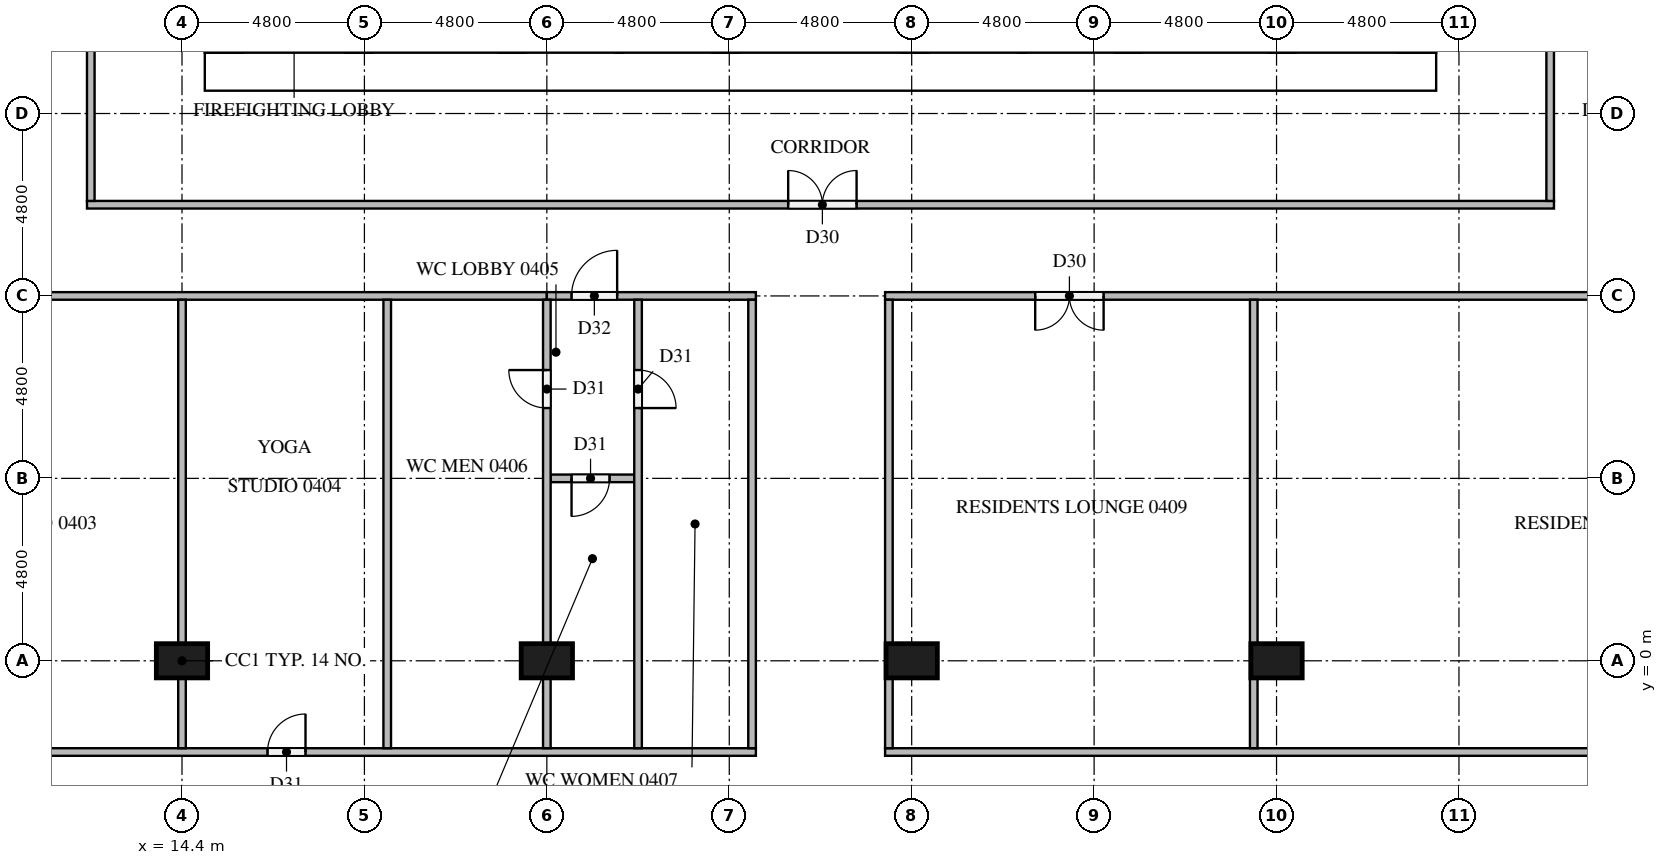
"""IFC4 building model, lengths in metres.
Left out: names, types, materials, properties, quantities, classifications, styles, units other than length and angle.
Written with IfcOpenShell. Run it as: python <this file> out.ifc"""

import sys

from ifc_helpers import new_model, si_unit, direction, frame, frame_2d, origin, origin_2d, place, context, subcontext, project, spatial, rectangle, extrude, element, fill, save


model = new_model("IFC4")
c1 = context("Model", 3, precision=1e-05, world=origin(), true_north=direction((0.0, 1.0)))
c2 = subcontext(c1, "Body", "Model", "MODEL_VIEW")
j1 = project(units=[si_unit("LENGTHUNIT", "METRE"), si_unit("PLANEANGLEUNIT", "RADIAN")], contexts=[c1])
p1 = place(None, origin())
s1 = spatial("IfcSite", under=j1, at=p1, CompositionType="ELEMENT")
p2 = place(p1, origin())
s2 = spatial("IfcBuilding", under=s1, at=p2, CompositionType="ELEMENT")
p3 = place(p2, frame((0.0, 0.0, 19.5)))
s3 = spatial("IfcBuildingStorey", under=s2, at=p3, CompositionType="ELEMENT", Elevation=19.5)
p4 = place(p3, frame((15.0, 15.5, 0.0), z_axis=(0.0, 0.0, 1.0), x_axis=(1.0, 0.0, 0.0)))
e1 = element("IfcWall", 1, at=p4, inside=s3, PredefinedType="SHEAR", context=c2, shape_type="SweptSolid", body=[
    extrude(rectangle(XDim=32.4, YDim=1.0, at=frame_2d((16.2, 0.0))), origin(), (0.0, 0.0, 1.0), 4.1),
])
p5 = place(p4, frame((15.3, 0.0, 0.0)))
e2 = element("IfcOpeningElement", 2, at=p5, cuts=e1, PredefinedType="OPENING", context=c2, shape_type="SweptSolid", body=[
    extrude(rectangle(XDim=1.8, YDim=2.1, at=frame_2d((0.9, 1.05))), frame((0.0, 0.51, 0.0), z_axis=(0.0, -1.0, 0.0), x_axis=(1.0, 0.0, 0.0)), (0.0, 0.0, 1.0), 1.02),
])
p6 = place(p3, frame((15.5, 16.0, 0.0), z_axis=(0.0, 0.0, 1.0), x_axis=(0.0, 1.0, 0.0)))
e3 = element("IfcWall", 3, at=p6, inside=s3, PredefinedType="SHEAR", context=c2, shape_type="SweptSolid", body=[
    extrude(rectangle(XDim=20.8, YDim=1.0, at=frame_2d((10.4, 0.0))), origin(), (0.0, 0.0, 1.0), 4.1),
])
p7 = place(p6, frame((4.76, 0.0, 0.0)))
e4 = element("IfcOpeningElement", 4, at=p7, cuts=e3, PredefinedType="OPENING", context=c2, shape_type="SweptSolid", body=[
    extrude(rectangle(XDim=1.2, YDim=2.1, at=frame_2d((0.6, 1.05))), frame((0.0, 0.51, 0.0), z_axis=(0.0, -1.0, 0.0), x_axis=(1.0, 0.0, 0.0)), (0.0, 0.0, 1.0), 1.02),
])
p8 = place(p3, frame((46.9, 16.0, 0.0), z_axis=(0.0, 0.0, 1.0), x_axis=(0.0, 1.0, 0.0)))
e5 = element("IfcWall", 5, at=p8, inside=s3, PredefinedType="SHEAR", context=c2, shape_type="SweptSolid", body=[
    extrude(rectangle(XDim=20.8, YDim=1.0, at=frame_2d((10.4, 0.0))), origin(), (0.0, 0.0, 1.0), 4.1),
])
p9 = place(p8, frame((10.1, 0.0, 0.0)))
e6 = element("IfcOpeningElement", 6, at=p9, cuts=e5, PredefinedType="OPENING", context=c2, shape_type="SweptSolid", body=[
    extrude(rectangle(XDim=1.2, YDim=2.1, at=frame_2d((0.6, 1.05))), frame((0.0, 0.51, 0.0), z_axis=(0.0, -1.0, 0.0), x_axis=(1.0, 0.0, 0.0)), (0.0, 0.0, 1.0), 1.02),
])
p10 = place(p3, frame((23.1, 16.0, 0.0), z_axis=(0.0, 0.0, 1.0), x_axis=(0.0, 1.0, 0.0)))
e7 = element("IfcWall", 7, at=p10, inside=s3, PredefinedType="SHEAR", context=c2, shape_type="SweptSolid", body=[
    extrude(rectangle(XDim=20.8, YDim=0.7, at=frame_2d((10.4, 0.0))), origin(), (0.0, 0.0, 1.0), 4.1),
])
for number, where, z_axis, x_axis in (
    (8, (14.4, 0.0, 0.0), (0.0, 0.0, 1.0), (1.0, 0.0, 0.0)),
    (9, (24.0, 0.0, 0.0), (0.0, 0.0, 1.0), (1.0, 0.0, 0.0)),
    (10, (33.6, 0.0, 0.0), (0.0, 0.0, 1.0), (1.0, 0.0, 0.0)),
    (11, (43.2, 0.0, 0.0), (0.0, 0.0, 1.0), (1.0, 0.0, 0.0)),
):
    element("IfcColumn", number, at=place(p3, frame(where, z_axis=z_axis, x_axis=x_axis)), inside=s3, PredefinedType="COLUMN", context=c2, shape_type="SweptSolid", body=[
        extrude(rectangle(XDim=1.35, YDim=0.9, at=origin_2d()), origin(), (0.0, 0.0, 1.0), 4.1),
    ])
p11 = place(p3, frame((-3.1, -2.4, 0.0), z_axis=(0.0, 0.0, 1.0), x_axis=(1.0, 0.0, 0.0)))
e12 = element("IfcWall", 12, at=p11, inside=s3, PredefinedType="PARTITIONING", context=c2, shape_type="SweptSolid", body=[
    extrude(rectangle(XDim=32.6, YDim=0.2, at=frame_2d((16.3, 0.0))), origin(), (0.0, 0.0, 1.0), 4.1),
])
p12 = place(p11, frame((1.05, 0.0, 0.0)))
e13 = element("IfcOpeningElement", 13, at=p12, cuts=e12, PredefinedType="OPENING", context=c2, shape_type="SweptSolid", body=[
    extrude(rectangle(XDim=1.0, YDim=2.1, at=frame_2d((0.5, 1.05))), frame((0.0, 0.11, 0.0), z_axis=(0.0, -1.0, 0.0), x_axis=(1.0, 0.0, 0.0)), (0.0, 0.0, 1.0), 0.22),
])
p13 = place(p11, frame((4.95, 0.0, 0.0)))
e14 = element("IfcOpeningElement", 14, at=p13, cuts=e12, PredefinedType="OPENING", context=c2, shape_type="SweptSolid", body=[
    extrude(rectangle(XDim=1.0, YDim=2.1, at=frame_2d((0.5, 1.05))), frame((0.0, 0.11, 0.0), z_axis=(0.0, -1.0, 0.0), x_axis=(1.0, 0.0, 0.0)), (0.0, 0.0, 1.0), 0.22),
])
p14 = place(p11, frame((19.75, 0.0, 0.0)))
e15 = element("IfcOpeningElement", 15, at=p14, cuts=e12, PredefinedType="OPENING", context=c2, shape_type="SweptSolid", body=[
    extrude(rectangle(XDim=1.0, YDim=2.1, at=frame_2d((0.5, 1.05))), frame((0.0, 0.11, 0.0), z_axis=(0.0, -1.0, 0.0), x_axis=(1.0, 0.0, 0.0)), (0.0, 0.0, 1.0), 0.22),
])
p15 = place(p3, frame((32.9, -2.4, 0.0), z_axis=(0.0, 0.0, 1.0), x_axis=(1.0, 0.0, 0.0)))
e16 = element("IfcWall", 16, at=p15, inside=s3, PredefinedType="PARTITIONING", context=c2, shape_type="SweptSolid", body=[
    extrude(rectangle(XDim=32.6, YDim=0.2, at=frame_2d((16.3, 0.0))), origin(), (0.0, 0.0, 1.0), 4.1),
])
p16 = place(p15, frame((18.65, 0.0, 0.0)))
e17 = element("IfcOpeningElement", 17, at=p16, cuts=e16, PredefinedType="OPENING", context=c2, shape_type="SweptSolid", body=[
    extrude(rectangle(XDim=1.8, YDim=2.1, at=frame_2d((0.9, 1.05))), frame((0.0, 0.11, 0.0), z_axis=(0.0, -1.0, 0.0), x_axis=(1.0, 0.0, 0.0)), (0.0, 0.0, 1.0), 0.22),
])
p17 = place(p3, frame((26.3, 4.8, 0.0), z_axis=(0.0, 0.0, 1.0), x_axis=(-1.0, 0.0, 0.0)))
e18 = element("IfcWall", 18, at=p17, inside=s3, PredefinedType="PARTITIONING", context=c2, shape_type="SweptSolid", body=[
    extrude(rectangle(XDim=2.2, YDim=0.2, at=frame_2d((1.1, 0.0))), origin(), (0.0, 0.0, 1.0), 4.1),
])
p18 = place(p17, frame((0.65, 0.0, 0.0)))
e19 = element("IfcOpeningElement", 19, at=p18, cuts=e18, PredefinedType="OPENING", context=c2, shape_type="SweptSolid", body=[
    extrude(rectangle(XDim=1.0, YDim=2.1, at=frame_2d((0.5, 1.05))), frame((0.0, 0.11, 0.0), z_axis=(0.0, -1.0, 0.0), x_axis=(1.0, 0.0, 0.0)), (0.0, 0.0, 1.0), 0.22),
])
p19 = place(p3, frame((24.0, 9.6, 0.0), z_axis=(0.0, 0.0, 1.0), x_axis=(-1.0, 0.0, 0.0)))
e20 = element("IfcWall", 20, at=p19, inside=s3, PredefinedType="PARTITIONING", context=c2, shape_type="SweptSolid", body=[
    extrude(rectangle(XDim=28.9, YDim=0.2, at=frame_2d((14.45, 0.0))), origin(), (0.0, 0.0, 1.0), 4.1),
])
p20 = place(p19, frame((13.95, 0.0, 0.0)))
e21 = element("IfcOpeningElement", 21, at=p20, cuts=e20, PredefinedType="OPENING", context=c2, shape_type="SweptSolid", body=[
    extrude(rectangle(XDim=1.0, YDim=2.1, at=frame_2d((0.5, 1.05))), frame((0.0, 0.11, 0.0), z_axis=(0.0, -1.0, 0.0), x_axis=(1.0, 0.0, 0.0)), (0.0, 0.0, 1.0), 0.22),
])
p21 = place(p3, frame((24.0, 9.6, 0.0), z_axis=(0.0, 0.0, 1.0), x_axis=(1.0, 0.0, 0.0)))
e22 = element("IfcWall", 22, at=p21, inside=s3, PredefinedType="PARTITIONING", context=c2, shape_type="SweptSolid", body=[
    extrude(rectangle(XDim=5.5, YDim=0.2, at=frame_2d((2.75, 0.0))), origin(), (0.0, 0.0, 1.0), 4.1),
])
p22 = place(p21, frame((0.65, 0.0, 0.0)))
e23 = element("IfcOpeningElement", 23, at=p22, cuts=e22, PredefinedType="OPENING", context=c2, shape_type="SweptSolid", body=[
    extrude(rectangle(XDim=1.2, YDim=2.1, at=frame_2d((0.6, 1.05))), frame((0.0, 0.11, 0.0), z_axis=(0.0, -1.0, 0.0), x_axis=(1.0, 0.0, 0.0)), (0.0, 0.0, 1.0), 0.22),
])
p23 = place(p3, frame((65.65, 9.6, 0.0), z_axis=(0.0, 0.0, 1.0), x_axis=(-1.0, 0.0, 0.0)))
e24 = element("IfcWall", 24, at=p23, inside=s3, PredefinedType="PARTITIONING", context=c2, shape_type="SweptSolid", body=[
    extrude(rectangle(XDim=32.75, YDim=0.2, at=frame_2d((16.375, 0.0))), origin(), (0.0, 0.0, 1.0), 4.1),
])
p24 = place(p23, frame((27.0, 0.0, 0.0)))
e25 = element("IfcOpeningElement", 25, at=p24, cuts=e24, PredefinedType="OPENING", context=c2, shape_type="SweptSolid", body=[
    extrude(rectangle(XDim=1.8, YDim=2.1, at=frame_2d((0.9, 1.05))), frame((0.0, 0.11, 0.0), z_axis=(0.0, -1.0, 0.0), x_axis=(1.0, 0.0, 0.0)), (0.0, 0.0, 1.0), 0.22),
])
p25 = place(p3, frame((11.9, 12.0, 0.0), z_axis=(0.0, 0.0, 1.0), x_axis=(1.0, 0.0, 0.0)))
e26 = element("IfcWall", 26, at=p25, inside=s3, PredefinedType="PARTITIONING", context=c2, shape_type="SweptSolid", body=[
    extrude(rectangle(XDim=38.6, YDim=0.2, at=frame_2d((19.3, 0.0))), origin(), (0.0, 0.0, 1.0), 4.1),
])
p26 = place(p25, frame((18.45, 0.0, 0.0)))
e27 = element("IfcOpeningElement", 27, at=p26, cuts=e26, PredefinedType="OPENING", context=c2, shape_type="SweptSolid", body=[
    extrude(rectangle(XDim=1.8, YDim=2.1, at=frame_2d((0.9, 1.05))), frame((0.0, 0.11, 0.0), z_axis=(0.0, -1.0, 0.0), x_axis=(1.0, 0.0, 0.0)), (0.0, 0.0, 1.0), 0.22),
])
p27 = place(p3, frame((12.0, 40.7, 0.0), z_axis=(0.0, 0.0, 1.0), x_axis=(0.0, -1.0, 0.0)))
e28 = element("IfcWall", 28, at=p27, inside=s3, PredefinedType="PARTITIONING", context=c2, shape_type="SweptSolid", body=[
    extrude(rectangle(XDim=28.6, YDim=0.2, at=frame_2d((14.3, 0.0))), origin(), (0.0, 0.0, 1.0), 4.1),
])
p28 = place(p27, frame((6.85, 0.0, 0.0)))
e29 = element("IfcOpeningElement", 29, at=p28, cuts=e28, PredefinedType="OPENING", context=c2, shape_type="SweptSolid", body=[
    extrude(rectangle(XDim=1.8, YDim=2.1, at=frame_2d((0.9, 1.05))), frame((0.0, 0.11, 0.0), z_axis=(0.0, -1.0, 0.0), x_axis=(1.0, 0.0, 0.0)), (0.0, 0.0, 1.0), 0.22),
])
for number, where, z_axis, x_axis in (
    (30, (14.4, -2.3, 0.0), (0.0, 0.0, 1.0), (0.0, 1.0, 0.0)),
    (31, (19.8, -2.3, 0.0), (0.0, 0.0, 1.0), (0.0, 1.0, 0.0)),
):
    element("IfcWall", number, at=place(p3, frame(where, z_axis=z_axis, x_axis=x_axis)), inside=s3, PredefinedType="PARTITIONING", context=c2, shape_type="SweptSolid", body=[
        extrude(rectangle(XDim=11.8, YDim=0.2, at=frame_2d((5.9, 0.0))), origin(), (0.0, 0.0, 1.0), 4.1),
    ])
p29 = place(p3, frame((24.0, -2.3, 0.0), z_axis=(0.0, 0.0, 1.0), x_axis=(0.0, 1.0, 0.0)))
e32 = element("IfcWall", 32, at=p29, inside=s3, PredefinedType="PARTITIONING", context=c2, shape_type="SweptSolid", body=[
    extrude(rectangle(XDim=11.8, YDim=0.2, at=frame_2d((5.9, 0.0))), origin(), (0.0, 0.0, 1.0), 4.1),
])
p30 = place(p29, frame((8.95, 0.0, 0.0)))
e33 = element("IfcOpeningElement", 33, at=p30, cuts=e32, PredefinedType="OPENING", context=c2, shape_type="SweptSolid", body=[
    extrude(rectangle(XDim=1.0, YDim=2.1, at=frame_2d((0.5, 1.05))), frame((0.0, 0.11, 0.0), z_axis=(0.0, -1.0, 0.0), x_axis=(1.0, 0.0, 0.0)), (0.0, 0.0, 1.0), 0.22),
])
p31 = place(p3, frame((26.4, 9.5, 0.0), z_axis=(0.0, 0.0, 1.0), x_axis=(0.0, -1.0, 0.0)))
e34 = element("IfcWall", 34, at=p31, inside=s3, PredefinedType="PARTITIONING", context=c2, shape_type="SweptSolid", body=[
    extrude(rectangle(XDim=11.8, YDim=0.2, at=frame_2d((5.9, 0.0))), origin(), (0.0, 0.0, 1.0), 4.1),
])
p32 = place(p31, frame((1.85, 0.0, 0.0)))
e35 = element("IfcOpeningElement", 35, at=p32, cuts=e34, PredefinedType="OPENING", context=c2, shape_type="SweptSolid", body=[
    extrude(rectangle(XDim=1.0, YDim=2.1, at=frame_2d((0.5, 1.05))), frame((0.0, 0.11, 0.0), z_axis=(0.0, -1.0, 0.0), x_axis=(1.0, 0.0, 0.0)), (0.0, 0.0, 1.0), 0.22),
])
for number, where, z_axis, x_axis in (
    (36, (29.4, -2.3, 0.0), (0.0, 0.0, 1.0), (0.0, 1.0, 0.0)),
    (37, (33.0, -2.3, 0.0), (0.0, 0.0, 1.0), (0.0, 1.0, 0.0)),
    (38, (42.6, -2.3, 0.0), (0.0, 0.0, 1.0), (0.0, 1.0, 0.0)),
):
    element("IfcWall", number, at=place(p3, frame(where, z_axis=z_axis, x_axis=x_axis)), inside=s3, PredefinedType="PARTITIONING", context=c2, shape_type="SweptSolid", body=[
        extrude(rectangle(XDim=11.8, YDim=0.2, at=frame_2d((5.9, 0.0))), origin(), (0.0, 0.0, 1.0), 4.1),
    ])
p33 = place(p3, frame((50.4, 12.1, 0.0), z_axis=(0.0, 0.0, 1.0), x_axis=(0.0, 1.0, 0.0)))
e39 = element("IfcWall", 39, at=p33, inside=s3, PredefinedType="PARTITIONING", context=c2, shape_type="SweptSolid", body=[
    extrude(rectangle(XDim=28.6, YDim=0.2, at=frame_2d((14.3, 0.0))), origin(), (0.0, 0.0, 1.0), 4.1),
])
p34 = place(p33, frame((20.05, 0.0, 0.0)))
e40 = element("IfcOpeningElement", 40, at=p34, cuts=e39, PredefinedType="OPENING", context=c2, shape_type="SweptSolid", body=[
    extrude(rectangle(XDim=1.8, YDim=2.1, at=frame_2d((0.9, 1.05))), frame((0.0, 0.11, 0.0), z_axis=(0.0, -1.0, 0.0), x_axis=(1.0, 0.0, 0.0)), (0.0, 0.0, 1.0), 0.22),
])
p35 = place(p5, frame((1.8, 0.0, 0.0), z_axis=(0.0, 0.0, 1.0), x_axis=(-1.0, 0.0, 0.0)))
e41 = element("IfcDoor", 41, at=p35, inside=s3, OperationType="DOUBLE_DOOR_SINGLE_SWING", PredefinedType="DOOR", context=c2, shape_type="SweptSolid", body=[
    extrude(rectangle(XDim=1.8, YDim=2.1, at=frame_2d((0.9, 1.05))), frame((0.0, 0.025, 0.0), z_axis=(0.0, -1.0, 0.0), x_axis=(1.0, 0.0, 0.0)), (0.0, 0.0, 1.0), 0.05),
])
fill(e2, e41)
p36 = place(p14, origin())
e42 = element("IfcDoor", 42, at=p36, inside=s3, OperationType="SINGLE_SWING_RIGHT", PredefinedType="DOOR", context=c2, shape_type="SweptSolid", body=[
    extrude(rectangle(XDim=1.0, YDim=2.1, at=frame_2d((0.5, 1.05))), frame((0.0, 0.025, 0.0), z_axis=(0.0, -1.0, 0.0), x_axis=(1.0, 0.0, 0.0)), (0.0, 0.0, 1.0), 0.05),
])
fill(e15, e42)
p37 = place(p22, origin())
e43 = element("IfcDoor", 43, at=p37, inside=s3, OperationType="SINGLE_SWING_RIGHT", PredefinedType="DOOR", context=c2, shape_type="SweptSolid", body=[
    extrude(rectangle(XDim=1.2, YDim=2.1, at=frame_2d((0.6, 1.05))), frame((0.0, 0.025, 0.0), z_axis=(0.0, -1.0, 0.0), x_axis=(1.0, 0.0, 0.0)), (0.0, 0.0, 1.0), 0.05),
])
fill(e23, e43)
p38 = place(p30, origin())
e44 = element("IfcDoor", 44, at=p38, inside=s3, OperationType="SINGLE_SWING_RIGHT", PredefinedType="DOOR", context=c2, shape_type="SweptSolid", body=[
    extrude(rectangle(XDim=1.0, YDim=2.1, at=frame_2d((0.5, 1.05))), frame((0.0, 0.025, 0.0), z_axis=(0.0, -1.0, 0.0), x_axis=(1.0, 0.0, 0.0)), (0.0, 0.0, 1.0), 0.05),
])
fill(e33, e44)
p39 = place(p32, origin())
e45 = element("IfcDoor", 45, at=p39, inside=s3, OperationType="SINGLE_SWING_RIGHT", PredefinedType="DOOR", context=c2, shape_type="SweptSolid", body=[
    extrude(rectangle(XDim=1.0, YDim=2.1, at=frame_2d((0.5, 1.05))), frame((0.0, 0.025, 0.0), z_axis=(0.0, -1.0, 0.0), x_axis=(1.0, 0.0, 0.0)), (0.0, 0.0, 1.0), 0.05),
])
fill(e35, e45)
p40 = place(p18, origin())
e46 = element("IfcDoor", 46, at=p40, inside=s3, OperationType="SINGLE_SWING_RIGHT", PredefinedType="DOOR", context=c2, shape_type="SweptSolid", body=[
    extrude(rectangle(XDim=1.0, YDim=2.1, at=frame_2d((0.5, 1.05))), frame((0.0, 0.025, 0.0), z_axis=(0.0, -1.0, 0.0), x_axis=(1.0, 0.0, 0.0)), (0.0, 0.0, 1.0), 0.05),
])
fill(e19, e46)
p41 = place(p24, origin())
e47 = element("IfcDoor", 47, at=p41, inside=s3, OperationType="DOUBLE_DOOR_SINGLE_SWING", PredefinedType="DOOR", context=c2, shape_type="SweptSolid", body=[
    extrude(rectangle(XDim=1.8, YDim=2.1, at=frame_2d((0.9, 1.05))), frame((0.0, 0.025, 0.0), z_axis=(0.0, -1.0, 0.0), x_axis=(1.0, 0.0, 0.0)), (0.0, 0.0, 1.0), 0.05),
])
fill(e25, e47)
p42 = place(p26, origin())
e48 = element("IfcDoor", 48, at=p42, inside=s3, OperationType="DOUBLE_DOOR_SINGLE_SWING", PredefinedType="DOOR", context=c2, shape_type="SweptSolid", body=[
    extrude(rectangle(XDim=1.8, YDim=2.1, at=frame_2d((0.9, 1.05))), frame((0.0, 0.025, 0.0), z_axis=(0.0, -1.0, 0.0), x_axis=(1.0, 0.0, 0.0)), (0.0, 0.0, 1.0), 0.05),
])
fill(e27, e48)
save(model, sys.argv[1])
